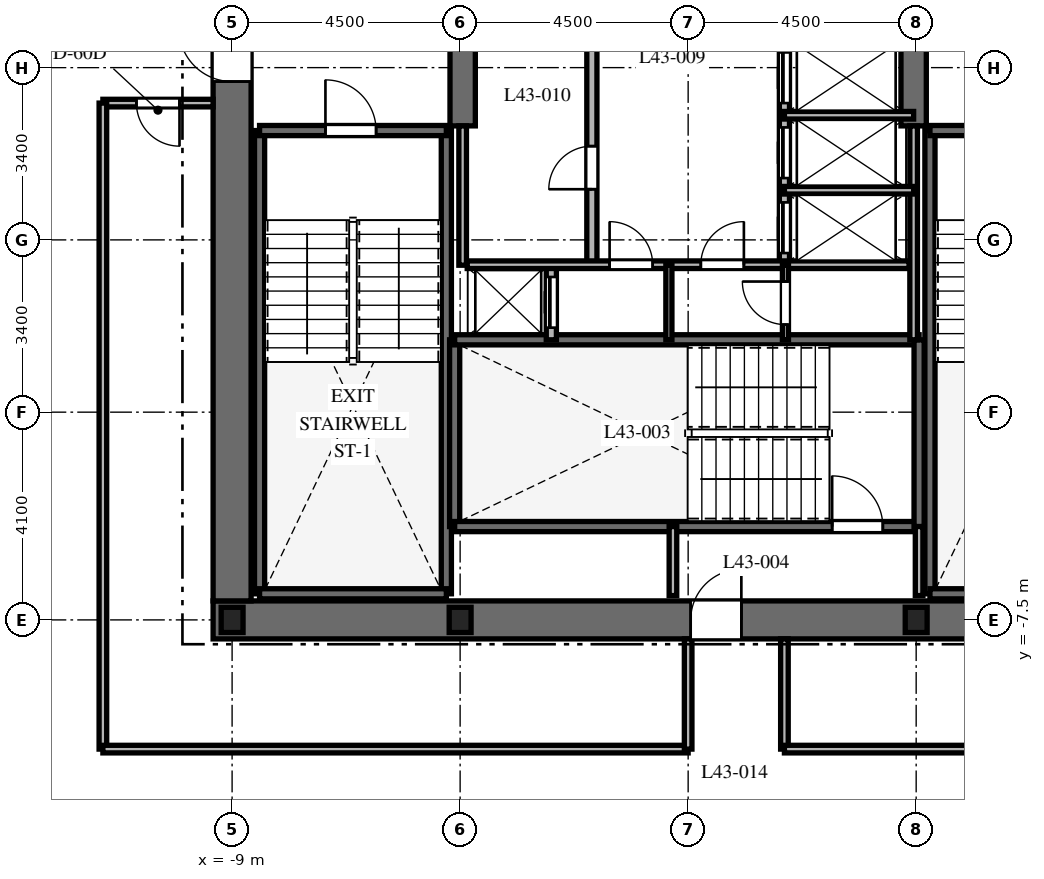
"""IFC4 building model, lengths in metres.
Left out: names, types, materials, properties, quantities, classifications, styles, units other than length and angle.
Written with IfcOpenShell. Run it as: python <this file> out.ifc"""

import sys

from ifc_helpers import new_model, si_unit, direction, frame, frame_2d, origin, origin_2d, place, context, subcontext, project, spatial, rectangle, i_section, extrude, element, fill, save


model = new_model("IFC4")
c1 = context("Model", 3, precision=1e-05, world=origin(), true_north=direction((0.0, 1.0)))
c2 = subcontext(c1, "Body", "Model", "MODEL_VIEW")
j1 = project(units=[si_unit("LENGTHUNIT", "METRE"), si_unit("PLANEANGLEUNIT", "RADIAN")], contexts=[c1])
p1 = place(None, origin())
s1 = spatial("IfcSite", under=j1, at=p1, CompositionType="ELEMENT")
p2 = place(p1, origin())
s2 = spatial("IfcBuilding", under=s1, at=p2, CompositionType="ELEMENT")
p3 = place(p2, frame((0.0, 0.0, 175.6)))
s3 = spatial("IfcBuildingStorey", under=s2, at=p3, CompositionType="ELEMENT", Elevation=175.6)
p4 = place(p3, frame((-9.375, -7.5, 0.0), z_axis=(0.0, 0.0, 1.0), x_axis=(1.0, 0.0, 0.0)))
e1 = element("IfcWall", 1, at=p4, inside=s3, PredefinedType="SHEAR", context=c2, shape_type="SweptSolid", body=[
    extrude(rectangle(XDim=18.75, YDim=0.75, at=frame_2d((9.375, 0.0))), origin(), (0.0, 0.0, 1.0), 3.7),
])
p5 = place(p4, frame((9.425, 0.0, 0.0)))
e2 = element("IfcOpeningElement", 2, at=p5, cuts=e1, PredefinedType="OPENING", context=c2, shape_type="SweptSolid", body=[
    extrude(rectangle(XDim=1.0, YDim=2.15, at=frame_2d((0.5, 1.075))), frame((0.0, 0.385, 0.0), z_axis=(0.0, -1.0, 0.0), x_axis=(1.0, 0.0, 0.0)), (0.0, 0.0, 1.0), 0.77),
])
p6 = place(p3, frame((-9.0, -7.125, 0.0), z_axis=(0.0, 0.0, 1.0), x_axis=(0.0, 1.0, 0.0)))
e3 = element("IfcWall", 3, at=p6, inside=s3, PredefinedType="SHEAR", context=c2, shape_type="SweptSolid", body=[
    extrude(rectangle(XDim=14.25, YDim=0.75, at=frame_2d((7.125, 0.0))), origin(), (0.0, 0.0, 1.0), 3.7),
])
p7 = place(p6, frame((10.25, 0.0, 0.0)))
e4 = element("IfcOpeningElement", 4, at=p7, cuts=e3, PredefinedType="OPENING", context=c2, shape_type="SweptSolid", body=[
    extrude(rectangle(XDim=1.05, YDim=2.15, at=frame_2d((0.525, 1.075))), frame((0.0, 0.385, 0.0), z_axis=(0.0, -1.0, 0.0), x_axis=(1.0, 0.0, 0.0)), (0.0, 0.0, 1.0), 0.77),
])
for number, where, z_axis, x_axis in (
    (5, (-4.45, 2.25, 0.0), (0.0, 0.0, 1.0), (0.0, 1.0, 0.0)),
    (6, (4.45, 2.25, 0.0), (0.0, 0.0, 1.0), (0.0, 1.0, 0.0)),
):
    element("IfcWall", number, at=place(p3, frame(where, z_axis=z_axis, x_axis=x_axis)), inside=s3, PredefinedType="SHEAR", context=c2, shape_type="SweptSolid", body=[
        extrude(rectangle(XDim=4.875, YDim=0.5, at=frame_2d((2.438, 0.0))), origin(), (0.0, 0.0, 1.0), 3.7),
    ])
for number, where, z_axis, x_axis in (
    (7, (-8.458, -6.985, 0.0), (0.0, 0.0, 1.0), (0.0, 1.0, 0.0)),
    (8, (-4.772, -6.985, 0.0), (0.0, 0.0, 1.0), (0.0, 1.0, 0.0)),
):
    element("IfcWall", number, at=place(p3, frame(where, z_axis=z_axis, x_axis=x_axis)), inside=s3, PredefinedType="SHEAR", context=c2, shape_type="SweptSolid", body=[
        extrude(rectangle(XDim=9.143, YDim=0.2, at=frame_2d((4.572, 0.0))), origin(), (0.0, 0.0, 1.0), 3.7),
    ])
p8 = place(p3, frame((-8.458, -6.985, 0.0), z_axis=(0.0, 0.0, 1.0), x_axis=(1.0, 0.0, 0.0)))
e9 = element("IfcWall", 9, at=p8, inside=s3, PredefinedType="SHEAR", context=c2, shape_type="SweptSolid", body=[
    extrude(rectangle(XDim=3.686, YDim=0.2, at=frame_2d((1.843, 0.0))), origin(), (0.0, 0.0, 1.0), 3.7),
])
p9 = place(p3, frame((-8.458, 2.158, 0.0), z_axis=(0.0, 0.0, 1.0), x_axis=(1.0, 0.0, 0.0)))
e10 = element("IfcWall", 10, at=p9, inside=s3, PredefinedType="SHEAR", context=c2, shape_type="SweptSolid", body=[
    extrude(rectangle(XDim=3.686, YDim=0.2, at=frame_2d((1.843, 0.0))), origin(), (0.0, 0.0, 1.0), 3.7),
])
p10 = place(p9, frame((1.3, 0.0, 0.0)))
e11 = element("IfcOpeningElement", 11, at=p10, cuts=e10, PredefinedType="OPENING", context=c2, shape_type="SweptSolid", body=[
    extrude(rectangle(XDim=1.0, YDim=2.15, at=frame_2d((0.5, 1.075))), frame((0.0, 0.11, 0.0), z_axis=(0.0, -1.0, 0.0), x_axis=(1.0, 0.0, 0.0)), (0.0, 0.0, 1.0), 0.22),
])
p11 = place(p3, frame((4.772, -6.985, 0.0), z_axis=(0.0, 0.0, 1.0), x_axis=(0.0, 1.0, 0.0)))
e12 = element("IfcWall", 12, at=p11, inside=s3, PredefinedType="SHEAR", context=c2, shape_type="SweptSolid", body=[
    extrude(rectangle(XDim=9.143, YDim=0.2, at=frame_2d((4.572, 0.0))), origin(), (0.0, 0.0, 1.0), 3.7),
])
p12 = place(p3, frame((4.772, -6.985, 0.0), z_axis=(0.0, 0.0, 1.0), x_axis=(1.0, 0.0, 0.0)))
e13 = element("IfcWall", 13, at=p12, inside=s3, PredefinedType="SHEAR", context=c2, shape_type="SweptSolid", body=[
    extrude(rectangle(XDim=3.686, YDim=0.2, at=frame_2d((1.843, 0.0))), origin(), (0.0, 0.0, 1.0), 3.7),
])
p13 = place(p3, frame((4.772, 2.158, 0.0), z_axis=(0.0, 0.0, 1.0), x_axis=(1.0, 0.0, 0.0)))
e14 = element("IfcWall", 14, at=p13, inside=s3, PredefinedType="SHEAR", context=c2, shape_type="SweptSolid", body=[
    extrude(rectangle(XDim=3.686, YDim=0.2, at=frame_2d((1.843, 0.0))), origin(), (0.0, 0.0, 1.0), 3.7),
])
p14 = place(p13, frame((1.35, 0.0, 0.0)))
e15 = element("IfcOpeningElement", 15, at=p14, cuts=e14, PredefinedType="OPENING", context=c2, shape_type="SweptSolid", body=[
    extrude(rectangle(XDim=1.0, YDim=2.15, at=frame_2d((0.5, 1.075))), frame((0.0, 0.11, 0.0), z_axis=(0.0, -1.0, 0.0), x_axis=(1.0, 0.0, 0.0)), (0.0, 0.0, 1.0), 0.22),
])
p15 = place(p3, frame((-4.608, -5.658, 0.0), z_axis=(0.0, 0.0, 1.0), x_axis=(0.0, 1.0, 0.0)))
e16 = element("IfcWall", 16, at=p15, inside=s3, PredefinedType="SHEAR", context=c2, shape_type="SweptSolid", body=[
    extrude(rectangle(XDim=3.686, YDim=0.2, at=frame_2d((1.843, 0.0))), origin(), (0.0, 0.0, 1.0), 3.7),
])
p16 = place(p3, frame((-4.608, -5.658, 0.0), z_axis=(0.0, 0.0, 1.0), x_axis=(1.0, 0.0, 0.0)))
e17 = element("IfcWall", 17, at=p16, inside=s3, PredefinedType="SHEAR", context=c2, shape_type="SweptSolid", body=[
    extrude(rectangle(XDim=9.166, YDim=0.2, at=frame_2d((4.583, 0.0))), origin(), (0.0, 0.0, 1.0), 3.7),
])
p17 = place(p16, frame((7.45, 0.0, 0.0)))
e18 = element("IfcOpeningElement", 18, at=p17, cuts=e17, PredefinedType="OPENING", context=c2, shape_type="SweptSolid", body=[
    extrude(rectangle(XDim=1.0, YDim=2.15, at=frame_2d((0.5, 1.075))), frame((0.0, 0.11, 0.0), z_axis=(0.0, -1.0, 0.0), x_axis=(1.0, 0.0, 0.0)), (0.0, 0.0, 1.0), 0.22),
])
p18 = place(p3, frame((-4.608, -1.972, 0.0), z_axis=(0.0, 0.0, 1.0), x_axis=(1.0, 0.0, 0.0)))
e19 = element("IfcWall", 19, at=p18, inside=s3, PredefinedType="SHEAR", context=c2, shape_type="SweptSolid", body=[
    extrude(rectangle(XDim=9.166, YDim=0.2, at=frame_2d((4.583, 0.0))), origin(), (0.0, 0.0, 1.0), 3.7),
])
p19 = place(p3, frame((4.558, -5.658, 0.0), z_axis=(0.0, 0.0, 1.0), x_axis=(0.0, 1.0, 0.0)))
e20 = element("IfcWall", 20, at=p19, inside=s3, PredefinedType="SHEAR", context=c2, shape_type="SweptSolid", body=[
    extrude(rectangle(XDim=3.686, YDim=0.2, at=frame_2d((1.843, 0.0))), origin(), (0.0, 0.0, 1.0), 3.7),
])
for number, where, z_axis, x_axis in (
    (21, (-9.0, -7.5, 0.0), (0.0, 0.0, 1.0), (1.0, 0.0, 0.0)),
    (22, (-4.5, -7.5, 0.0), (0.0, 0.0, 1.0), (1.0, 0.0, 0.0)),
    (23, (4.5, -7.5, 0.0), (0.0, 0.0, 1.0), (1.0, 0.0, 0.0)),
):
    element("IfcColumn", number, at=place(p3, frame(where, z_axis=z_axis, x_axis=x_axis)), inside=s3, PredefinedType="COLUMN", context=c2, shape_type="SweptSolid", body=[
        extrude(i_section(OverallWidth=0.432, OverallDepth=0.498, WebThickness=0.056, FlangeThickness=0.089, at=origin_2d()), origin(), (0.0, 0.0, 1.0), 3.7),
    ])
for number, where, z_axis, x_axis in (
    (24, (-0.3, -7.02, 0.0), (0.0, 0.0, 1.0), (0.0, 1.0, 0.0)),
    (25, (4.558, -7.02, 0.0), (0.0, 0.0, 1.0), (0.0, 1.0, 0.0)),
):
    element("IfcWall", number, at=place(p3, frame(where, z_axis=z_axis, x_axis=x_axis)), inside=s3, PredefinedType="PARTITIONING", context=c2, shape_type="SweptSolid", body=[
        extrude(rectangle(XDim=1.362, YDim=0.15, at=frame_2d((0.681, 0.0))), origin(), (0.0, 0.0, 1.0), 3.4),
    ])
p20 = place(p3, frame((-2.7, -1.972, 0.0), z_axis=(0.0, 0.0, 1.0), x_axis=(0.0, 1.0, 0.0)))
e26 = element("IfcWall", 26, at=p20, inside=s3, PredefinedType="PARTITIONING", context=c2, shape_type="SweptSolid", body=[
    extrude(rectangle(XDim=1.472, YDim=0.2, at=frame_2d((0.736, 0.0))), origin(), (0.0, 0.0, 1.0), 3.4),
])
p21 = place(p20, frame((0.24, 0.0, 0.0)))
e27 = element("IfcOpeningElement", 27, at=p21, cuts=e26, PredefinedType="OPENING", context=c2, shape_type="SweptSolid", body=[
    extrude(rectangle(XDim=1.0, YDim=2.2, at=frame_2d((0.5, 1.1))), frame((0.0, 0.11, 0.0), z_axis=(0.0, -1.0, 0.0), x_axis=(1.0, 0.0, 0.0)), (0.0, 0.0, 1.0), 0.22),
])
p22 = place(p3, frame((-4.45, -0.5, 0.0), z_axis=(0.0, 0.0, 1.0), x_axis=(0.0, 1.0, 0.0)))
e28 = element("IfcWall", 28, at=p22, inside=s3, PredefinedType="PARTITIONING", context=c2, shape_type="SweptSolid", body=[
    extrude(rectangle(XDim=2.75, YDim=0.15, at=frame_2d((1.375, 0.0))), origin(), (0.0, 0.0, 1.0), 3.4),
])
p23 = place(p3, frame((4.45, -1.972, 0.0), z_axis=(0.0, 0.0, 1.0), x_axis=(0.0, 1.0, 0.0)))
e29 = element("IfcWall", 29, at=p23, inside=s3, PredefinedType="PARTITIONING", context=c2, shape_type="SweptSolid", body=[
    extrude(rectangle(XDim=4.222, YDim=0.15, at=frame_2d((2.111, 0.0))), origin(), (0.0, 0.0, 1.0), 3.4),
])
p24 = place(p3, frame((-1.9, -0.5, 0.0), z_axis=(0.0, 0.0, 1.0), x_axis=(0.0, 1.0, 0.0)))
e30 = element("IfcWall", 30, at=p24, inside=s3, PredefinedType="PARTITIONING", context=c2, shape_type="SweptSolid", body=[
    extrude(rectangle(XDim=4.44, YDim=0.2, at=frame_2d((2.22, 0.0))), origin(), (0.0, 0.0, 1.0), 3.4),
])
p25 = place(p24, frame((1.5, 0.0, 0.0)))
e31 = element("IfcOpeningElement", 31, at=p25, cuts=e30, PredefinedType="OPENING", context=c2, shape_type="SweptSolid", body=[
    extrude(rectangle(XDim=0.85, YDim=2.03, at=frame_2d((0.425, 1.015))), frame((0.0, 0.11, 0.0), z_axis=(0.0, -1.0, 0.0), x_axis=(1.0, 0.0, 0.0)), (0.0, 0.0, 1.0), 0.22),
])
p26 = place(p3, frame((1.9, -0.5, 0.0), z_axis=(0.0, 0.0, 1.0), x_axis=(0.0, 1.0, 0.0)))
e32 = element("IfcWall", 32, at=p26, inside=s3, PredefinedType="PARTITIONING", context=c2, shape_type="SweptSolid", body=[
    extrude(rectangle(XDim=4.44, YDim=0.2, at=frame_2d((2.22, 0.0))), origin(), (0.0, 0.0, 1.0), 3.4),
])
p27 = place(p26, frame((0.24, 0.0, 0.0)))
e33 = element("IfcOpeningElement", 33, at=p27, cuts=e32, PredefinedType="OPENING", context=c2, shape_type="SweptSolid", body=[
    extrude(rectangle(XDim=1.0, YDim=2.2, at=frame_2d((0.5, 1.1))), frame((0.0, 0.11, 0.0), z_axis=(0.0, -1.0, 0.0), x_axis=(1.0, 0.0, 0.0)), (0.0, 0.0, 1.0), 0.22),
])
p28 = place(p26, frame((1.72, 0.0, 0.0)))
e34 = element("IfcOpeningElement", 34, at=p28, cuts=e32, PredefinedType="OPENING", context=c2, shape_type="SweptSolid", body=[
    extrude(rectangle(XDim=1.0, YDim=2.2, at=frame_2d((0.5, 1.1))), frame((0.0, 0.11, 0.0), z_axis=(0.0, -1.0, 0.0), x_axis=(1.0, 0.0, 0.0)), (0.0, 0.0, 1.0), 0.22),
])
p29 = place(p26, frame((3.2, 0.0, 0.0)))
e35 = element("IfcOpeningElement", 35, at=p29, cuts=e32, PredefinedType="OPENING", context=c2, shape_type="SweptSolid", body=[
    extrude(rectangle(XDim=1.0, YDim=2.2, at=frame_2d((0.5, 1.1))), frame((0.0, 0.11, 0.0), z_axis=(0.0, -1.0, 0.0), x_axis=(1.0, 0.0, 0.0)), (0.0, 0.0, 1.0), 0.22),
])
for number, where, z_axis, x_axis in (
    (36, (1.9, 0.98, 0.0), (0.0, 0.0, 1.0), (1.0, 0.0, 0.0)),
    (37, (1.9, 2.46, 0.0), (0.0, 0.0, 1.0), (1.0, 0.0, 0.0)),
):
    element("IfcWall", number, at=place(p3, frame(where, z_axis=z_axis, x_axis=x_axis)), inside=s3, PredefinedType="PARTITIONING", context=c2, shape_type="SweptSolid", body=[
        extrude(rectangle(XDim=2.55, YDim=0.15, at=frame_2d((1.275, 0.0))), origin(), (0.0, 0.0, 1.0), 3.4),
    ])
p30 = place(p3, frame((-4.36, -0.49, 0.0), z_axis=(0.0, 0.0, 1.0), x_axis=(1.0, 0.0, 0.0)))
e38 = element("IfcWall", 38, at=p30, inside=s3, PredefinedType="PARTITIONING", context=c2, shape_type="SweptSolid", body=[
    extrude(rectangle(XDim=8.72, YDim=0.15, at=frame_2d((4.36, 0.0))), origin(), (0.0, 0.0, 1.0), 3.4),
])
p31 = place(p30, frame((2.81, 0.0, 0.0)))
e39 = element("IfcOpeningElement", 39, at=p31, cuts=e38, PredefinedType="OPENING", context=c2, shape_type="SweptSolid", body=[
    extrude(rectangle(XDim=0.85, YDim=2.03, at=frame_2d((0.425, 1.015))), frame((0.0, 0.085, 0.0), z_axis=(0.0, -1.0, 0.0), x_axis=(1.0, 0.0, 0.0)), (0.0, 0.0, 1.0), 0.17),
])
p32 = place(p30, frame((4.61, 0.0, 0.0)))
e40 = element("IfcOpeningElement", 40, at=p32, cuts=e38, PredefinedType="OPENING", context=c2, shape_type="SweptSolid", body=[
    extrude(rectangle(XDim=0.85, YDim=2.03, at=frame_2d((0.425, 1.015))), frame((0.0, 0.085, 0.0), z_axis=(0.0, -1.0, 0.0), x_axis=(1.0, 0.0, 0.0)), (0.0, 0.0, 1.0), 0.17),
])
p33 = place(p3, frame((-0.38, -1.972, 0.0), z_axis=(0.0, 0.0, 1.0), x_axis=(0.0, 1.0, 0.0)))
e41 = element("IfcWall", 41, at=p33, inside=s3, PredefinedType="PARTITIONING", context=c2, shape_type="SweptSolid", body=[
    extrude(rectangle(XDim=1.472, YDim=0.12, at=frame_2d((0.736, 0.0))), origin(), (0.0, 0.0, 1.0), 3.4),
])
p34 = place(p3, frame((1.92, -1.972, 0.0), z_axis=(0.0, 0.0, 1.0), x_axis=(0.0, 1.0, 0.0)))
e42 = element("IfcWall", 42, at=p34, inside=s3, PredefinedType="PARTITIONING", context=c2, shape_type="SweptSolid", body=[
    extrude(rectangle(XDim=1.472, YDim=0.12, at=frame_2d((0.736, 0.0))), origin(), (0.0, 0.0, 1.0), 3.4),
])
p35 = place(p34, frame((0.3, 0.0, 0.0)))
e43 = element("IfcOpeningElement", 43, at=p35, cuts=e42, PredefinedType="OPENING", context=c2, shape_type="SweptSolid", body=[
    extrude(rectangle(XDim=0.85, YDim=2.03, at=frame_2d((0.425, 1.015))), frame((0.0, 0.07, 0.0), z_axis=(0.0, -1.0, 0.0), x_axis=(1.0, 0.0, 0.0)), (0.0, 0.0, 1.0), 0.14),
])
p36 = place(p3, frame((-9.375, 2.7, 0.0), z_axis=(0.0, 0.0, 1.0), x_axis=(-1.0, 0.0, 0.0)))
e44 = element("IfcWall", 44, at=p36, inside=s3, PredefinedType="PARTITIONING", context=c2, shape_type="SweptSolid", body=[
    extrude(rectangle(XDim=2.175, YDim=0.15, at=frame_2d((1.087, 0.0))), origin(), (0.0, 0.0, 1.0), 3.4),
])
p37 = place(p36, frame((0.663, 0.0, 0.0)))
e45 = element("IfcOpeningElement", 45, at=p37, cuts=e44, PredefinedType="OPENING", context=c2, shape_type="SweptSolid", body=[
    extrude(rectangle(XDim=0.85, YDim=2.03, at=frame_2d((0.425, 1.015))), frame((0.0, 0.085, 0.0), z_axis=(0.0, -1.0, 0.0), x_axis=(1.0, 0.0, 0.0)), (0.0, 0.0, 1.0), 0.17),
])
p38 = place(p3, frame((-11.55, 2.7, 0.0), z_axis=(0.0, 0.0, 1.0), x_axis=(0.0, -1.0, 0.0)))
e46 = element("IfcWall", 46, at=p38, inside=s3, PredefinedType="PARTITIONING", context=c2, shape_type="SweptSolid", body=[
    extrude(rectangle(XDim=12.75, YDim=0.15, at=frame_2d((6.375, 0.0))), origin(), (0.0, 0.0, 1.0), 2.84),
])
p39 = place(p3, frame((-11.55, -10.05, 0.0), z_axis=(0.0, 0.0, 1.0), x_axis=(1.0, 0.0, 0.0)))
e47 = element("IfcWall", 47, at=p39, inside=s3, PredefinedType="PARTITIONING", context=c2, shape_type="SweptSolid", body=[
    extrude(rectangle(XDim=11.55, YDim=0.15, at=frame_2d((5.775, 0.0))), origin(), (0.0, 0.0, 1.0), 2.84),
])
for number, where, z_axis, x_axis in (
    (48, (0.0, -10.05, 0.0), (0.0, 0.0, 1.0), (0.0, 1.0, 0.0)),
    (49, (1.9, -7.875, 0.0), (0.0, 0.0, 1.0), (0.0, -1.0, 0.0)),
):
    element("IfcWall", number, at=place(p3, frame(where, z_axis=z_axis, x_axis=x_axis)), inside=s3, PredefinedType="PARTITIONING", context=c2, shape_type="SweptSolid", body=[
        extrude(rectangle(XDim=2.175, YDim=0.15, at=frame_2d((1.087, 0.0))), origin(), (0.0, 0.0, 1.0), 3.4),
    ])
p40 = place(p3, frame((1.9, -10.05, 0.0), z_axis=(0.0, 0.0, 1.0), x_axis=(1.0, 0.0, 0.0)))
e50 = element("IfcWall", 50, at=p40, inside=s3, PredefinedType="PARTITIONING", context=c2, shape_type="SweptSolid", body=[
    extrude(rectangle(XDim=9.65, YDim=0.15, at=frame_2d((4.825, 0.0))), origin(), (0.0, 0.0, 1.0), 2.84),
])
p41 = place(p10, origin())
e51 = element("IfcDoor", 51, at=p41, inside=s3, OperationType="SINGLE_SWING_LEFT", PredefinedType="DOOR", context=c2, shape_type="SweptSolid", body=[
    extrude(rectangle(XDim=1.0, YDim=2.15, at=frame_2d((0.5, 1.075))), frame((0.0, 0.025, 0.0), z_axis=(0.0, -1.0, 0.0), x_axis=(1.0, 0.0, 0.0)), (0.0, 0.0, 1.0), 0.05),
])
fill(e11, e51)
p42 = place(p17, origin())
e52 = element("IfcDoor", 52, at=p42, inside=s3, OperationType="SINGLE_SWING_LEFT", PredefinedType="DOOR", context=c2, shape_type="SweptSolid", body=[
    extrude(rectangle(XDim=1.0, YDim=2.15, at=frame_2d((0.5, 1.075))), frame((0.0, 0.025, 0.0), z_axis=(0.0, -1.0, 0.0), x_axis=(1.0, 0.0, 0.0)), (0.0, 0.0, 1.0), 0.05),
])
fill(e18, e52)
p43 = place(p5, origin())
e53 = element("IfcDoor", 53, at=p43, inside=s3, OperationType="SINGLE_SWING_RIGHT", PredefinedType="DOOR", context=c2, shape_type="SweptSolid", body=[
    extrude(rectangle(XDim=1.0, YDim=2.15, at=frame_2d((0.5, 1.075))), frame((0.0, 0.025, 0.0), z_axis=(0.0, -1.0, 0.0), x_axis=(1.0, 0.0, 0.0)), (0.0, 0.0, 1.0), 0.05),
])
fill(e2, e53)
p44 = place(p7, origin())
e54 = element("IfcDoor", 54, at=p44, inside=s3, OperationType="SINGLE_SWING_RIGHT", PredefinedType="DOOR", context=c2, shape_type="SweptSolid", body=[
    extrude(rectangle(XDim=1.05, YDim=2.15, at=frame_2d((0.525, 1.075))), frame((0.0, 0.025, 0.0), z_axis=(0.0, -1.0, 0.0), x_axis=(1.0, 0.0, 0.0)), (0.0, 0.0, 1.0), 0.05),
])
fill(e4, e54)
p45 = place(p21, origin())
e55 = element("IfcDoor", 55, at=p45, inside=s3, OperationType="SLIDING_TO_LEFT", PredefinedType="DOOR", context=c2, shape_type="SweptSolid", body=[
    extrude(rectangle(XDim=1.0, YDim=2.2, at=frame_2d((0.5, 1.1))), frame((0.0, 0.025, 0.0), z_axis=(0.0, -1.0, 0.0), x_axis=(1.0, 0.0, 0.0)), (0.0, 0.0, 1.0), 0.05),
])
fill(e27, e55)
p46 = place(p25, origin())
e56 = element("IfcDoor", 56, at=p46, inside=s3, OperationType="SINGLE_SWING_LEFT", PredefinedType="DOOR", context=c2, shape_type="SweptSolid", body=[
    extrude(rectangle(XDim=0.85, YDim=2.03, at=frame_2d((0.425, 1.015))), frame((0.0, 0.025, 0.0), z_axis=(0.0, -1.0, 0.0), x_axis=(1.0, 0.0, 0.0)), (0.0, 0.0, 1.0), 0.05),
])
fill(e31, e56)
p47 = place(p27, origin())
e57 = element("IfcDoor", 57, at=p47, inside=s3, OperationType="SLIDING_TO_RIGHT", PredefinedType="DOOR", context=c2, shape_type="SweptSolid", body=[
    extrude(rectangle(XDim=1.0, YDim=2.2, at=frame_2d((0.5, 1.1))), frame((0.0, 0.025, 0.0), z_axis=(0.0, -1.0, 0.0), x_axis=(1.0, 0.0, 0.0)), (0.0, 0.0, 1.0), 0.05),
])
fill(e33, e57)
p48 = place(p28, origin())
e58 = element("IfcDoor", 58, at=p48, inside=s3, OperationType="SLIDING_TO_RIGHT", PredefinedType="DOOR", context=c2, shape_type="SweptSolid", body=[
    extrude(rectangle(XDim=1.0, YDim=2.2, at=frame_2d((0.5, 1.1))), frame((0.0, 0.025, 0.0), z_axis=(0.0, -1.0, 0.0), x_axis=(1.0, 0.0, 0.0)), (0.0, 0.0, 1.0), 0.05),
])
fill(e34, e58)
p49 = place(p29, origin())
e59 = element("IfcDoor", 59, at=p49, inside=s3, OperationType="SLIDING_TO_RIGHT", PredefinedType="DOOR", context=c2, shape_type="SweptSolid", body=[
    extrude(rectangle(XDim=1.0, YDim=2.2, at=frame_2d((0.5, 1.1))), frame((0.0, 0.025, 0.0), z_axis=(0.0, -1.0, 0.0), x_axis=(1.0, 0.0, 0.0)), (0.0, 0.0, 1.0), 0.05),
])
fill(e35, e59)
p50 = place(p31, origin())
e60 = element("IfcDoor", 60, at=p50, inside=s3, OperationType="SINGLE_SWING_LEFT", PredefinedType="DOOR", context=c2, shape_type="SweptSolid", body=[
    extrude(rectangle(XDim=0.85, YDim=2.03, at=frame_2d((0.425, 1.015))), frame((0.0, 0.025, 0.0), z_axis=(0.0, -1.0, 0.0), x_axis=(1.0, 0.0, 0.0)), (0.0, 0.0, 1.0), 0.05),
])
fill(e39, e60)
p51 = place(p32, origin())
e61 = element("IfcDoor", 61, at=p51, inside=s3, OperationType="SINGLE_SWING_RIGHT", PredefinedType="DOOR", context=c2, shape_type="SweptSolid", body=[
    extrude(rectangle(XDim=0.85, YDim=2.03, at=frame_2d((0.425, 1.015))), frame((0.0, 0.025, 0.0), z_axis=(0.0, -1.0, 0.0), x_axis=(1.0, 0.0, 0.0)), (0.0, 0.0, 1.0), 0.05),
])
fill(e40, e61)
p52 = place(p35, origin())
e62 = element("IfcDoor", 62, at=p52, inside=s3, OperationType="SINGLE_SWING_RIGHT", PredefinedType="DOOR", context=c2, shape_type="SweptSolid", body=[
    extrude(rectangle(XDim=0.85, YDim=2.03, at=frame_2d((0.425, 1.015))), frame((0.0, 0.025, 0.0), z_axis=(0.0, -1.0, 0.0), x_axis=(1.0, 0.0, 0.0)), (0.0, 0.0, 1.0), 0.05),
])
fill(e43, e62)
p53 = place(p37, origin())
e63 = element("IfcDoor", 63, at=p53, inside=s3, OperationType="SINGLE_SWING_LEFT", PredefinedType="DOOR", context=c2, shape_type="SweptSolid", body=[
    extrude(rectangle(XDim=0.85, YDim=2.03, at=frame_2d((0.425, 1.015))), frame((0.0, 0.025, 0.0), z_axis=(0.0, -1.0, 0.0), x_axis=(1.0, 0.0, 0.0)), (0.0, 0.0, 1.0), 0.05),
])
fill(e45, e63)
save(model, sys.argv[1])
